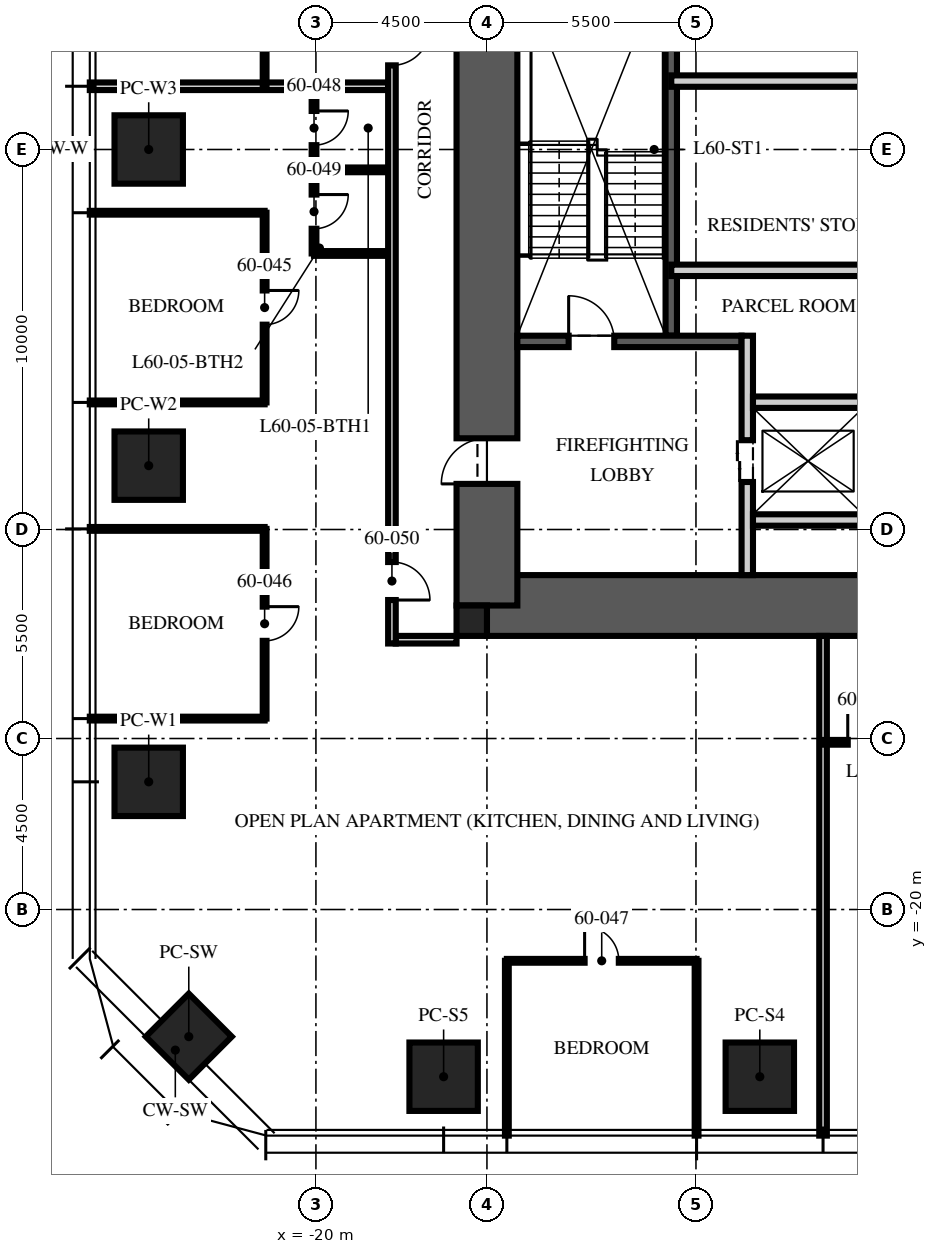
"""IFC4 building model, lengths in metres.
Left out: names, types, materials, properties, quantities, classifications, styles, units other than length and angle.
Written with IfcOpenShell. Run it as: python <this file> out.ifc"""

import sys

from ifc_helpers import new_model, si_unit, direction, frame, frame_2d, origin, origin_2d, place, context, subcontext, project, spatial, rectangle, extrude, element, fill, save


model = new_model("IFC4")
c1 = context("Model", 3, precision=1e-05, world=origin(), true_north=direction((0.0, 1.0)))
c2 = subcontext(c1, "Body", "Model", "MODEL_VIEW")
j1 = project(units=[si_unit("LENGTHUNIT", "METRE"), si_unit("PLANEANGLEUNIT", "RADIAN")], contexts=[c1])
p1 = place(None, origin())
s1 = spatial("IfcSite", under=j1, at=p1, CompositionType="ELEMENT")
p2 = place(p1, origin())
s2 = spatial("IfcBuilding", under=s1, at=p2, CompositionType="ELEMENT")
p3 = place(p2, frame((0.0, 0.0, 240.75)))
s3 = spatial("IfcBuildingStorey", under=s2, at=p3, CompositionType="ELEMENT", Elevation=240.75)
p4 = place(p3, frame((-15.5, -12.0, -0.25), z_axis=(0.0, 0.0, 1.0), x_axis=(1.0, 0.0, 0.0)))
e1 = element("IfcWall", 1, at=p4, inside=s3, PredefinedType="SHEAR", context=c2, shape_type="SweptSolid", body=[
    extrude(rectangle(XDim=31.0, YDim=1.6, at=frame_2d((15.5, 0.0))), origin(), (0.0, 0.0, 1.0), 3.75),
])
p5 = place(p3, frame((-15.5, -12.0, -0.25), z_axis=(0.0, 0.0, 1.0), x_axis=(0.0, 1.0, 0.0)))
e2 = element("IfcWall", 2, at=p5, inside=s3, PredefinedType="SHEAR", context=c2, shape_type="SweptSolid", body=[
    extrude(rectangle(XDim=24.0, YDim=1.6, at=frame_2d((12.0, 0.0))), origin(), (0.0, 0.0, 1.0), 3.75),
])
p6 = place(p5, frame((3.2, 0.0, 0.25)))
e3 = element("IfcOpeningElement", 3, at=p6, cuts=e2, PredefinedType="OPENING", context=c2, shape_type="SweptSolid", body=[
    extrude(rectangle(XDim=1.2, YDim=2.1, at=frame_2d((0.6, 1.05))), frame((0.0, 0.81, 0.0), z_axis=(0.0, -1.0, 0.0), x_axis=(1.0, 0.0, 0.0)), (0.0, 0.0, 1.0), 1.62),
])
p7 = place(p5, frame((19.3, 0.0, 0.25)))
e4 = element("IfcOpeningElement", 4, at=p7, cuts=e2, PredefinedType="OPENING", context=c2, shape_type="SweptSolid", body=[
    extrude(rectangle(XDim=1.8, YDim=2.1, at=frame_2d((0.9, 1.05))), frame((0.0, 0.81, 0.0), z_axis=(0.0, -1.0, 0.0), x_axis=(1.0, 0.0, 0.0)), (0.0, 0.0, 1.0), 1.62),
])
p8 = place(p3, frame((-15.9, -12.4, -0.25), z_axis=(0.0, 0.0, 1.0), x_axis=(1.0, 0.0, 0.0)))
e5 = element("IfcColumn", 5, at=p8, inside=s3, PredefinedType="COLUMN", context=c2, shape_type="SweptSolid", body=[
    extrude(rectangle(XDim=0.8, YDim=0.8, at=origin_2d()), origin(), (0.0, 0.0, 1.0), 3.75),
])
for number, where, z_axis, x_axis in (
    (6, (-8.32, -24.4, 0.0), (0.0, 0.0, 1.0), (1.0, 0.0, 0.0)),
    (7, (-16.64, -24.4, 0.0), (0.0, 0.0, 1.0), (1.0, 0.0, 0.0)),
    (8, (-24.4, -16.64, 0.0), (0.0, 0.0, 1.0), (0.0, 1.0, 0.0)),
    (9, (-24.4, -8.32, 0.0), (0.0, 0.0, 1.0), (0.0, 1.0, 0.0)),
    (10, (-24.4, 0.0, 0.0), (0.0, 0.0, 1.0), (0.0, 1.0, 0.0)),
):
    element("IfcColumn", number, at=place(p3, frame(where, z_axis=z_axis, x_axis=x_axis)), inside=s3, PredefinedType="COLUMN", context=c2, shape_type="SweptSolid", body=[
        extrude(rectangle(XDim=1.8, YDim=1.8, at=origin_2d()), origin(), (0.0, 0.0, 1.0), 3.75),
    ])
p9 = place(p3, frame((-23.346, -23.346, 0.0), z_axis=(0.0, 0.0, 1.0), x_axis=(0.707106781187, -0.707106781187, 0.0)))
e11 = element("IfcColumn", 11, at=p9, inside=s3, PredefinedType="COLUMN", context=c2, shape_type="SweptSolid", body=[
    extrude(rectangle(XDim=1.6, YDim=1.6, at=origin_2d()), origin(), (0.0, 0.0, 1.0), 3.75),
])
p10 = place(p3, frame((-10.65, -4.9, 0.0), z_axis=(0.0, 0.0, 1.0), x_axis=(0.0, 1.0, 0.0)))
e12 = element("IfcWall", 12, at=p10, inside=s3, PredefinedType="SOLIDWALL", context=c2, shape_type="SweptSolid", body=[
    extrude(rectangle(XDim=10.1, YDim=0.3, at=frame_2d((5.05, 0.0))), origin(), (0.0, 0.0, 1.0), 3.5),
])
p11 = place(p3, frame((-14.7, -5.05, 0.0), z_axis=(0.0, 0.0, 1.0), x_axis=(1.0, 0.0, 0.0)))
e13 = element("IfcWall", 13, at=p11, inside=s3, PredefinedType="SOLIDWALL", context=c2, shape_type="SweptSolid", body=[
    extrude(rectangle(XDim=5.9, YDim=0.3, at=frame_2d((2.95, 0.0))), origin(), (0.0, 0.0, 1.0), 3.5),
])
p12 = place(p11, frame((1.35, 0.0, 0.0)))
e14 = element("IfcOpeningElement", 14, at=p12, cuts=e13, PredefinedType="OPENING", context=c2, shape_type="SweptSolid", body=[
    extrude(rectangle(XDim=1.2, YDim=2.1, at=frame_2d((0.6, 1.05))), frame((0.0, 0.16, 0.0), z_axis=(0.0, -1.0, 0.0), x_axis=(1.0, 0.0, 0.0)), (0.0, 0.0, 1.0), 0.32),
])
p13 = place(p3, frame((-8.65, -11.2, 0.0), z_axis=(0.0, 0.0, 1.0), x_axis=(0.0, 1.0, 0.0)))
e15 = element("IfcWall", 15, at=p13, inside=s3, PredefinedType="PARTITIONING", context=c2, shape_type="SweptSolid", body=[
    extrude(rectangle(XDim=6.3, YDim=0.3, at=frame_2d((3.15, 0.0))), origin(), (0.0, 0.0, 1.0), 3.5),
])
p14 = place(p13, frame((2.45, 0.0, 0.0)))
e16 = element("IfcOpeningElement", 16, at=p14, cuts=e15, PredefinedType="OPENING", context=c2, shape_type="SweptSolid", body=[
    extrude(rectangle(XDim=1.1, YDim=2.1, at=frame_2d((0.55, 1.05))), frame((0.0, 0.16, 0.0), z_axis=(0.0, -1.0, 0.0), x_axis=(1.0, 0.0, 0.0)), (0.0, 0.0, 1.0), 0.32),
])
p15 = place(p3, frame((-8.5, -6.65, 0.0), z_axis=(0.0, 0.0, 1.0), x_axis=(1.0, 0.0, 0.0)))
e17 = element("IfcWall", 17, at=p15, inside=s3, PredefinedType="PARTITIONING", context=c2, shape_type="SweptSolid", body=[
    extrude(rectangle(XDim=17.0, YDim=0.3, at=frame_2d((8.5, 0.0))), origin(), (0.0, 0.0, 1.0), 3.5),
])
p16 = place(p15, frame((7.8, 0.0, 0.0)))
e18 = element("IfcOpeningElement", 18, at=p16, cuts=e17, PredefinedType="OPENING", context=c2, shape_type="SweptSolid", body=[
    extrude(rectangle(XDim=1.3, YDim=2.4, at=frame_2d((0.65, 1.2))), frame((0.0, 0.16, 0.0), z_axis=(0.0, -1.0, 0.0), x_axis=(1.0, 0.0, 0.0)), (0.0, 0.0, 1.0), 0.32),
])
p17 = place(p15, frame((5.65, 0.0, 0.0)))
e19 = element("IfcOpeningElement", 19, at=p17, cuts=e17, PredefinedType="OPENING", context=c2, shape_type="SweptSolid", body=[
    extrude(rectangle(XDim=0.9, YDim=2.1, at=frame_2d((0.45, 1.05))), frame((0.0, 0.16, 0.0), z_axis=(0.0, -1.0, 0.0), x_axis=(1.0, 0.0, 0.0)), (0.0, 0.0, 1.0), 0.32),
])
p18 = place(p15, frame((10.4, 0.0, 0.0)))
e20 = element("IfcOpeningElement", 20, at=p18, cuts=e17, PredefinedType="OPENING", context=c2, shape_type="SweptSolid", body=[
    extrude(rectangle(XDim=0.9, YDim=2.1, at=frame_2d((0.45, 1.05))), frame((0.0, 0.16, 0.0), z_axis=(0.0, -1.0, 0.0), x_axis=(1.0, 0.0, 0.0)), (0.0, 0.0, 1.0), 0.32),
])
p19 = place(p3, frame((-8.5, -9.75, 0.0), z_axis=(0.0, 0.0, 1.0), x_axis=(1.0, 0.0, 0.0)))
e21 = element("IfcWall", 21, at=p19, inside=s3, PredefinedType="PARTITIONING", context=c2, shape_type="SweptSolid", body=[
    extrude(rectangle(XDim=2.9, YDim=0.3, at=frame_2d((1.45, 0.0))), origin(), (0.0, 0.0, 1.0), 3.5),
])
p20 = place(p3, frame((-10.65, 1.8, 0.0), z_axis=(0.0, 0.0, 1.0), x_axis=(1.0, 0.0, 0.0)))
e22 = element("IfcWall", 22, at=p20, inside=s3, PredefinedType="PARTITIONING", context=c2, shape_type="SweptSolid", body=[
    extrude(rectangle(XDim=21.3, YDim=0.3, at=frame_2d((10.65, 0.0))), origin(), (0.0, 0.0, 1.0), 3.5),
])
p21 = place(p20, frame((10.05, 0.0, 0.0)))
e23 = element("IfcOpeningElement", 23, at=p21, cuts=e22, PredefinedType="OPENING", context=c2, shape_type="SweptSolid", body=[
    extrude(rectangle(XDim=1.2, YDim=2.1, at=frame_2d((0.6, 1.05))), frame((0.0, 0.16, 0.0), z_axis=(0.0, -1.0, 0.0), x_axis=(1.0, 0.0, 0.0)), (0.0, 0.0, 1.0), 0.32),
])
p22 = place(p20, frame((19.238, 0.0, 0.0)))
e24 = element("IfcOpeningElement", 24, at=p22, cuts=e22, PredefinedType="OPENING", context=c2, shape_type="SweptSolid", body=[
    extrude(rectangle(XDim=0.9, YDim=2.1, at=frame_2d((0.45, 1.05))), frame((0.0, 0.16, 0.0), z_axis=(0.0, -1.0, 0.0), x_axis=(1.0, 0.0, 0.0)), (0.0, 0.0, 1.0), 0.32),
])
p23 = place(p3, frame((-10.65, -3.18, 0.0), z_axis=(0.0, 0.0, 1.0), x_axis=(1.0, 0.0, 0.0)))
e25 = element("IfcWall", 25, at=p23, inside=s3, PredefinedType="PARTITIONING", context=c2, shape_type="SweptSolid", body=[
    extrude(rectangle(XDim=6.45, YDim=0.3, at=frame_2d((3.225, 0.0))), origin(), (0.0, 0.0, 1.0), 3.5),
])
p24 = place(p3, frame((-16.3, -12.9, 0.0), z_axis=(0.0, 0.0, 1.0), x_axis=(-1.0, 0.0, 0.0)))
e26 = element("IfcWall", 26, at=p24, inside=s3, PredefinedType="PARTITIONING", context=c2, shape_type="SweptSolid", body=[
    extrude(rectangle(XDim=1.6, YDim=0.2, at=frame_2d((0.8, 0.0))), origin(), (0.0, 0.0, 1.0), 2.3),
])
p25 = place(p3, frame((-18.1, 1.664, 0.0), z_axis=(0.0, 0.0, 1.0), x_axis=(-1.0, 0.0, 0.0)))
e27 = element("IfcWall", 27, at=p25, inside=s3, PredefinedType="PARTITIONING", context=c2, shape_type="SweptSolid", body=[
    extrude(rectangle(XDim=7.85, YDim=0.2, at=frame_2d((3.925, 0.0))), origin(), (0.0, 0.0, 1.0), 2.91),
])
for number, where, z_axis, x_axis in (
    (28, (-21.35, -1.664, 0.0), (0.0, 0.0, 1.0), (-1.0, 0.0, 0.0)),
    (29, (-21.35, -6.656, 0.0), (0.0, 0.0, 1.0), (-1.0, 0.0, 0.0)),
    (30, (-21.35, -9.984, 0.0), (0.0, 0.0, 1.0), (-1.0, 0.0, 0.0)),
    (31, (-21.35, -14.976, 0.0), (0.0, 0.0, 1.0), (-1.0, 0.0, 0.0)),
    (32, (-14.976, -21.35, 0.0), (0.0, 0.0, 1.0), (0.0, -1.0, 0.0)),
    (33, (-9.984, -21.35, 0.0), (0.0, 0.0, 1.0), (0.0, -1.0, 0.0)),
):
    element("IfcWall", number, at=place(p3, frame(where, z_axis=z_axis, x_axis=x_axis)), inside=s3, PredefinedType="PARTITIONING", context=c2, shape_type="SweptSolid", body=[
        extrude(rectangle(XDim=4.6, YDim=0.1, at=frame_2d((2.3, 0.0))), origin(), (0.0, 0.0, 1.0), 2.91),
    ])
p26 = place(p3, frame((-6.656, -12.8, 0.0), z_axis=(0.0, 0.0, 1.0), x_axis=(0.0, -1.0, 0.0)))
e34 = element("IfcWall", 34, at=p26, inside=s3, PredefinedType="PARTITIONING", context=c2, shape_type="SweptSolid", body=[
    extrude(rectangle(XDim=13.15, YDim=0.2, at=frame_2d((6.575, 0.0))), origin(), (0.0, 0.0, 1.0), 2.91),
])
p27 = place(p3, frame((-21.35, 6.656, 0.0), z_axis=(0.0, 0.0, 1.0), x_axis=(0.0, -1.0, 0.0)))
e35 = element("IfcWall", 35, at=p27, inside=s3, PredefinedType="PARTITIONING", context=c2, shape_type="SweptSolid", body=[
    extrude(rectangle(XDim=4.992, YDim=0.1, at=frame_2d((2.496, 0.0))), origin(), (0.0, 0.0, 1.0), 2.81),
])
p28 = place(p27, frame((2.046, 0.0, 0.0)))
e36 = element("IfcOpeningElement", 36, at=p28, cuts=e35, PredefinedType="OPENING", context=c2, shape_type="SweptSolid", body=[
    extrude(rectangle(XDim=0.9, YDim=2.1, at=frame_2d((0.45, 1.05))), frame((0.0, 0.06, 0.0), z_axis=(0.0, -1.0, 0.0), x_axis=(1.0, 0.0, 0.0)), (0.0, 0.0, 1.0), 0.12),
])
p29 = place(p3, frame((-21.35, -1.664, 0.0), z_axis=(0.0, 0.0, 1.0), x_axis=(0.0, -1.0, 0.0)))
e37 = element("IfcWall", 37, at=p29, inside=s3, PredefinedType="PARTITIONING", context=c2, shape_type="SweptSolid", body=[
    extrude(rectangle(XDim=4.992, YDim=0.1, at=frame_2d((2.496, 0.0))), origin(), (0.0, 0.0, 1.0), 2.81),
])
p30 = place(p29, frame((2.046, 0.0, 0.0)))
e38 = element("IfcOpeningElement", 38, at=p30, cuts=e37, PredefinedType="OPENING", context=c2, shape_type="SweptSolid", body=[
    extrude(rectangle(XDim=0.9, YDim=2.1, at=frame_2d((0.45, 1.05))), frame((0.0, 0.06, 0.0), z_axis=(0.0, -1.0, 0.0), x_axis=(1.0, 0.0, 0.0)), (0.0, 0.0, 1.0), 0.12),
])
p31 = place(p3, frame((-21.35, -9.984, 0.0), z_axis=(0.0, 0.0, 1.0), x_axis=(0.0, -1.0, 0.0)))
e39 = element("IfcWall", 39, at=p31, inside=s3, PredefinedType="PARTITIONING", context=c2, shape_type="SweptSolid", body=[
    extrude(rectangle(XDim=4.992, YDim=0.1, at=frame_2d((2.496, 0.0))), origin(), (0.0, 0.0, 1.0), 2.81),
])
p32 = place(p31, frame((2.046, 0.0, 0.0)))
e40 = element("IfcOpeningElement", 40, at=p32, cuts=e39, PredefinedType="OPENING", context=c2, shape_type="SweptSolid", body=[
    extrude(rectangle(XDim=0.9, YDim=2.1, at=frame_2d((0.45, 1.05))), frame((0.0, 0.06, 0.0), z_axis=(0.0, -1.0, 0.0), x_axis=(1.0, 0.0, 0.0)), (0.0, 0.0, 1.0), 0.12),
])
p33 = place(p3, frame((-14.976, -21.35, 0.0), z_axis=(0.0, 0.0, 1.0), x_axis=(1.0, 0.0, 0.0)))
e41 = element("IfcWall", 41, at=p33, inside=s3, PredefinedType="PARTITIONING", context=c2, shape_type="SweptSolid", body=[
    extrude(rectangle(XDim=4.992, YDim=0.1, at=frame_2d((2.496, 0.0))), origin(), (0.0, 0.0, 1.0), 2.81),
])
p34 = place(p33, frame((2.046, 0.0, 0.0)))
e42 = element("IfcOpeningElement", 42, at=p34, cuts=e41, PredefinedType="OPENING", context=c2, shape_type="SweptSolid", body=[
    extrude(rectangle(XDim=0.9, YDim=2.1, at=frame_2d((0.45, 1.05))), frame((0.0, 0.06, 0.0), z_axis=(0.0, -1.0, 0.0), x_axis=(1.0, 0.0, 0.0)), (0.0, 0.0, 1.0), 0.12),
])
p35 = place(p3, frame((-20.05, 1.664, 0.0), z_axis=(0.0, 0.0, 1.0), x_axis=(0.0, -1.0, 0.0)))
e43 = element("IfcWall", 43, at=p35, inside=s3, PredefinedType="PARTITIONING", context=c2, shape_type="SweptSolid", body=[
    extrude(rectangle(XDim=4.4, YDim=0.125, at=frame_2d((2.2, 0.0))), origin(), (0.0, 0.0, 1.0), 2.6),
])
p36 = place(p35, frame((0.65, 0.0, 0.0)))
e44 = element("IfcOpeningElement", 44, at=p36, cuts=e43, PredefinedType="OPENING", context=c2, shape_type="SweptSolid", body=[
    extrude(rectangle(XDim=0.9, YDim=2.1, at=frame_2d((0.45, 1.05))), frame((0.0, 0.073, 0.0), z_axis=(0.0, -1.0, 0.0), x_axis=(1.0, 0.0, 0.0)), (0.0, 0.0, 1.0), 0.145),
])
p37 = place(p35, frame((2.85, 0.0, 0.0)))
e45 = element("IfcOpeningElement", 45, at=p37, cuts=e43, PredefinedType="OPENING", context=c2, shape_type="SweptSolid", body=[
    extrude(rectangle(XDim=0.9, YDim=2.1, at=frame_2d((0.45, 1.05))), frame((0.0, 0.073, 0.0), z_axis=(0.0, -1.0, 0.0), x_axis=(1.0, 0.0, 0.0)), (0.0, 0.0, 1.0), 0.145),
])
for number, where, z_axis, x_axis in (
    (46, (-18.1, -0.536, 0.0), (0.0, 0.0, 1.0), (-1.0, 0.0, 0.0)),
    (47, (-18.1, -2.736, 0.0), (0.0, 0.0, 1.0), (-1.0, 0.0, 0.0)),
):
    element("IfcWall", number, at=place(p3, frame(where, z_axis=z_axis, x_axis=x_axis)), inside=s3, PredefinedType="PARTITIONING", context=c2, shape_type="SweptSolid", body=[
        extrude(rectangle(XDim=1.95, YDim=0.125, at=frame_2d((0.975, 0.0))), origin(), (0.0, 0.0, 1.0), 3.5),
    ])
p38 = place(p3, frame((-6.656, -15.6, 0.0), z_axis=(0.0, 0.0, 1.0), x_axis=(1.0, 0.0, 0.0)))
e48 = element("IfcWall", 48, at=p38, inside=s3, PredefinedType="PARTITIONING", context=c2, shape_type="SweptSolid", body=[
    extrude(rectangle(XDim=2.2, YDim=0.125, at=frame_2d((1.1, 0.0))), origin(), (0.0, 0.0, 1.0), 3.5),
])
p39 = place(p38, frame((0.65, 0.0, 0.0)))
e49 = element("IfcOpeningElement", 49, at=p39, cuts=e48, PredefinedType="OPENING", context=c2, shape_type="SweptSolid", body=[
    extrude(rectangle(XDim=0.9, YDim=2.1, at=frame_2d((0.45, 1.05))), frame((0.0, 0.073, 0.0), z_axis=(0.0, -1.0, 0.0), x_axis=(1.0, 0.0, 0.0)), (0.0, 0.0, 1.0), 0.145),
])
p40 = place(p3, frame((-18.0, 13.0, 0.0), z_axis=(0.0, 0.0, 1.0), x_axis=(0.0, -1.0, 0.0)))
e50 = element("IfcWall", 50, at=p40, inside=s3, PredefinedType="PARTITIONING", context=c2, shape_type="SweptSolid", body=[
    extrude(rectangle(XDim=26.0, YDim=0.2, at=frame_2d((13.0, 0.0))), origin(), (0.0, 0.0, 1.0), 2.6),
])
p41 = place(p40, frame((1.35, 0.0, 0.0)))
e51 = element("IfcOpeningElement", 51, at=p41, cuts=e50, PredefinedType="OPENING", context=c2, shape_type="SweptSolid", body=[
    extrude(rectangle(XDim=1.0, YDim=2.2, at=frame_2d((0.5, 1.1))), frame((0.0, 0.11, 0.0), z_axis=(0.0, -1.0, 0.0), x_axis=(1.0, 0.0, 0.0)), (0.0, 0.0, 1.0), 0.22),
])
p42 = place(p40, frame((9.786, 0.0, 0.0)))
e52 = element("IfcOpeningElement", 52, at=p42, cuts=e50, PredefinedType="OPENING", context=c2, shape_type="SweptSolid", body=[
    extrude(rectangle(XDim=1.0, YDim=2.2, at=frame_2d((0.5, 1.1))), frame((0.0, 0.11, 0.0), z_axis=(0.0, -1.0, 0.0), x_axis=(1.0, 0.0, 0.0)), (0.0, 0.0, 1.0), 0.22),
])
p43 = place(p40, frame((23.856, 0.0, 0.0)))
e53 = element("IfcOpeningElement", 53, at=p43, cuts=e50, PredefinedType="OPENING", context=c2, shape_type="SweptSolid", body=[
    extrude(rectangle(XDim=1.0, YDim=2.2, at=frame_2d((0.5, 1.1))), frame((0.0, 0.11, 0.0), z_axis=(0.0, -1.0, 0.0), x_axis=(1.0, 0.0, 0.0)), (0.0, 0.0, 1.0), 0.22),
])
p44 = place(p12, origin())
e54 = element("IfcDoor", 54, at=p44, inside=s3, OperationType="SINGLE_SWING_LEFT", PredefinedType="DOOR", context=c2, shape_type="SweptSolid", body=[
    extrude(rectangle(XDim=1.2, YDim=2.1, at=frame_2d((0.6, 1.05))), frame((0.0, 0.025, 0.0), z_axis=(0.0, -1.0, 0.0), x_axis=(1.0, 0.0, 0.0)), (0.0, 0.0, 1.0), 0.05),
])
fill(e14, e54)
p45 = place(p6, origin())
e55 = element("IfcDoor", 55, at=p45, inside=s3, OperationType="SINGLE_SWING_LEFT", PredefinedType="DOOR", context=c2, shape_type="SweptSolid", body=[
    extrude(rectangle(XDim=1.2, YDim=2.1, at=frame_2d((0.6, 1.05))), frame((0.0, 0.025, 0.0), z_axis=(0.0, -1.0, 0.0), x_axis=(1.0, 0.0, 0.0)), (0.0, 0.0, 1.0), 0.05),
])
fill(e3, e55)
p46 = place(p14, origin())
e56 = element("IfcDoor", 56, at=p46, inside=s3, OperationType="DOUBLE_DOOR_SLIDING", PredefinedType="DOOR", context=c2, shape_type="SweptSolid", body=[
    extrude(rectangle(XDim=1.1, YDim=2.1, at=frame_2d((0.55, 1.05))), frame((0.0, 0.025, 0.0), z_axis=(0.0, -1.0, 0.0), x_axis=(1.0, 0.0, 0.0)), (0.0, 0.0, 1.0), 0.05),
])
fill(e16, e56)
p47 = place(p42, origin())
e57 = element("IfcDoor", 57, at=p47, inside=s3, OperationType="SINGLE_SWING_LEFT", PredefinedType="DOOR", context=c2, shape_type="SweptSolid", body=[
    extrude(rectangle(XDim=1.0, YDim=2.2, at=frame_2d((0.5, 1.1))), frame((0.0, 0.025, 0.0), z_axis=(0.0, -1.0, 0.0), x_axis=(1.0, 0.0, 0.0)), (0.0, 0.0, 1.0), 0.05),
])
fill(e52, e57)
p48 = place(p30, origin())
e58 = element("IfcDoor", 58, at=p48, inside=s3, OperationType="SINGLE_SWING_LEFT", PredefinedType="DOOR", context=c2, shape_type="SweptSolid", body=[
    extrude(rectangle(XDim=0.9, YDim=2.1, at=frame_2d((0.45, 1.05))), frame((0.0, 0.025, 0.0), z_axis=(0.0, -1.0, 0.0), x_axis=(1.0, 0.0, 0.0)), (0.0, 0.0, 1.0), 0.05),
])
fill(e38, e58)
p49 = place(p32, origin())
e59 = element("IfcDoor", 59, at=p49, inside=s3, OperationType="SINGLE_SWING_LEFT", PredefinedType="DOOR", context=c2, shape_type="SweptSolid", body=[
    extrude(rectangle(XDim=0.9, YDim=2.1, at=frame_2d((0.45, 1.05))), frame((0.0, 0.025, 0.0), z_axis=(0.0, -1.0, 0.0), x_axis=(1.0, 0.0, 0.0)), (0.0, 0.0, 1.0), 0.05),
])
fill(e40, e59)
p50 = place(p34, origin())
e60 = element("IfcDoor", 60, at=p50, inside=s3, OperationType="SINGLE_SWING_LEFT", PredefinedType="DOOR", context=c2, shape_type="SweptSolid", body=[
    extrude(rectangle(XDim=0.9, YDim=2.1, at=frame_2d((0.45, 1.05))), frame((0.0, 0.025, 0.0), z_axis=(0.0, -1.0, 0.0), x_axis=(1.0, 0.0, 0.0)), (0.0, 0.0, 1.0), 0.05),
])
fill(e42, e60)
p51 = place(p36, origin())
e61 = element("IfcDoor", 61, at=p51, inside=s3, OperationType="SINGLE_SWING_LEFT", PredefinedType="DOOR", context=c2, shape_type="SweptSolid", body=[
    extrude(rectangle(XDim=0.9, YDim=2.1, at=frame_2d((0.45, 1.05))), frame((0.0, 0.025, 0.0), z_axis=(0.0, -1.0, 0.0), x_axis=(1.0, 0.0, 0.0)), (0.0, 0.0, 1.0), 0.05),
])
fill(e44, e61)
p52 = place(p37, origin())
e62 = element("IfcDoor", 62, at=p52, inside=s3, OperationType="SINGLE_SWING_LEFT", PredefinedType="DOOR", context=c2, shape_type="SweptSolid", body=[
    extrude(rectangle(XDim=0.9, YDim=2.1, at=frame_2d((0.45, 1.05))), frame((0.0, 0.025, 0.0), z_axis=(0.0, -1.0, 0.0), x_axis=(1.0, 0.0, 0.0)), (0.0, 0.0, 1.0), 0.05),
])
fill(e45, e62)
p53 = place(p43, origin())
e63 = element("IfcDoor", 63, at=p53, inside=s3, OperationType="SINGLE_SWING_RIGHT", PredefinedType="DOOR", context=c2, shape_type="SweptSolid", body=[
    extrude(rectangle(XDim=1.0, YDim=2.2, at=frame_2d((0.5, 1.1))), frame((0.0, 0.025, 0.0), z_axis=(0.0, -1.0, 0.0), x_axis=(1.0, 0.0, 0.0)), (0.0, 0.0, 1.0), 0.05),
])
fill(e53, e63)
p54 = place(p39, origin())
e64 = element("IfcDoor", 64, at=p54, inside=s3, OperationType="SINGLE_SWING_LEFT", PredefinedType="DOOR", context=c2, shape_type="SweptSolid", body=[
    extrude(rectangle(XDim=0.9, YDim=2.1, at=frame_2d((0.45, 1.05))), frame((0.0, 0.025, 0.0), z_axis=(0.0, -1.0, 0.0), x_axis=(1.0, 0.0, 0.0)), (0.0, 0.0, 1.0), 0.05),
])
fill(e49, e64)
save(model, sys.argv[1])
